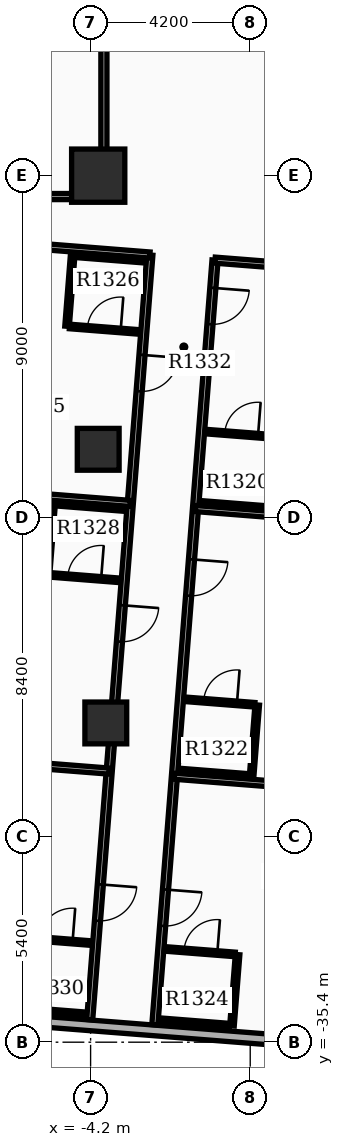
"""IFC4 building model, lengths in metres.
Left out: names, types, materials, properties, quantities, classifications, styles, units other than length and angle.
Written with IfcOpenShell. Run it as: python <this file> out.ifc"""

import sys

from ifc_helpers import new_model, si_unit, direction, frame, frame_2d, origin, origin_2d, place, context, subcontext, project, spatial, rectangle, extrude, element, fill, save


model = new_model("IFC4")
c1 = context("Model", 3, precision=1e-05, world=origin(), true_north=direction((0.0, 1.0)))
c2 = subcontext(c1, "Body", "Model", "MODEL_VIEW")
j1 = project(units=[si_unit("LENGTHUNIT", "METRE"), si_unit("PLANEANGLEUNIT", "RADIAN")], contexts=[c1])
p1 = place(None, origin())
s1 = spatial("IfcSite", under=j1, at=p1, CompositionType="ELEMENT")
p2 = place(p1, origin())
s2 = spatial("IfcBuilding", under=s1, at=p2, CompositionType="ELEMENT")
p3 = place(p2, frame((0.0, 0.0, 83.4)))
s3 = spatial("IfcBuildingStorey", under=s2, at=p3, CompositionType="ELEMENT", Elevation=83.4)
p4 = place(p3, frame((-4.0, -12.6, 0.0), z_axis=(0.0, 0.0, 1.0), x_axis=(1.0, 0.0, 0.0)))
e1 = element("IfcColumn", 1, at=p4, inside=s3, PredefinedType="COLUMN", context=c2, shape_type="SweptSolid", body=[
    extrude(rectangle(XDim=1.4, YDim=1.4, at=origin_2d()), origin(), (0.0, 0.0, 1.0), 3.9),
])
for number, where, z_axis, x_axis in (
    (2, (-4.0, -19.8, 0.0), (0.0, 0.0, 1.0), (1.0, 0.0, 0.0)),
    (3, (-3.8, -27.0, 0.0), (0.0, 0.0, 1.0), (1.0, 0.0, 0.0)),
):
    element("IfcColumn", number, at=place(p3, frame(where, z_axis=z_axis, x_axis=x_axis)), inside=s3, PredefinedType="COLUMN", context=c2, shape_type="SweptSolid", body=[
        extrude(rectangle(XDim=1.1, YDim=1.1, at=origin_2d()), origin(), (0.0, 0.0, 1.0), 3.9),
    ])
p5 = place(p3, frame((-9.599, -34.533, 0.0), z_axis=(0.0, 0.0, 1.0), x_axis=(0.996916198482, -0.078473519122, 0.0)))
e4 = element("IfcWall", 4, at=p5, inside=s3, PredefinedType="STANDARD", context=c2, shape_type="SweptSolid", body=[
    extrude(rectangle(XDim=13.72, YDim=0.28, at=frame_2d((6.86, 0.0))), origin(), (0.0, 0.0, 1.0), 2.91),
])
p6 = place(p5, frame((0.85, 0.0, 0.85)))
e5 = element("IfcOpeningElement", 5, at=p6, cuts=e4, PredefinedType="OPENING", context=c2, shape_type="SweptSolid", body=[
    extrude(rectangle(XDim=1.0, YDim=1.5, at=frame_2d((0.5, 0.75))), frame((0.0, 0.15, 0.0), z_axis=(0.0, -1.0, 0.0), x_axis=(1.0, 0.0, 0.0)), (0.0, 0.0, 1.0), 0.3),
])
p7 = place(p3, frame((-12.4, -13.15, 0.0), z_axis=(0.0, 0.0, 1.0), x_axis=(1.0, 0.0, 0.0)))
e6 = element("IfcWall", 6, at=p7, inside=s3, PredefinedType="PARTITIONING", context=c2, shape_type="SweptSolid", body=[
    extrude(rectangle(XDim=8.55, YDim=0.16, at=frame_2d((4.275, 0.0))), origin(), (0.0, 0.0, 1.0), 2.9),
])
p8 = place(p3, frame((-3.85, -13.065, 0.0), z_axis=(0.0, 0.0, 1.0), x_axis=(0.0, 1.0, 0.0)))
e7 = element("IfcWall", 7, at=p8, inside=s3, PredefinedType="PARTITIONING", context=c2, shape_type="SweptSolid", body=[
    extrude(rectangle(XDim=3.93, YDim=0.16, at=frame_2d((1.965, 0.0))), origin(), (0.0, 0.0, 1.0), 2.9),
])
p9 = place(p3, frame((-0.926, -14.823, 0.0), z_axis=(0.0, 0.0, 1.0), x_axis=(-0.078460461943, -0.996917226209, 0.0)))
e8 = element("IfcWall", 8, at=p9, inside=s3, PredefinedType="PARTITIONING", context=c2, shape_type="SweptSolid", body=[
    extrude(rectangle(XDim=20.182, YDim=0.16, at=frame_2d((10.091, 0.0))), origin(), (0.0, 0.0, 1.0), 2.9),
])
p10 = place(p9, frame((0.731, 0.0, 0.0)))
e9 = element("IfcOpeningElement", 9, at=p10, cuts=e8, PredefinedType="OPENING", context=c2, shape_type="SweptSolid", body=[
    extrude(rectangle(XDim=0.96, YDim=2.15, at=frame_2d((0.48, 1.075))), frame((0.0, 0.09, 0.0), z_axis=(0.0, -1.0, 0.0), x_axis=(1.0, 0.0, 0.0)), (0.0, 0.0, 1.0), 0.18),
])
p11 = place(p9, frame((7.896, 0.0, 0.0)))
e10 = element("IfcOpeningElement", 10, at=p11, cuts=e8, PredefinedType="OPENING", context=c2, shape_type="SweptSolid", body=[
    extrude(rectangle(XDim=0.96, YDim=2.15, at=frame_2d((0.48, 1.075))), frame((0.0, 0.09, 0.0), z_axis=(0.0, -1.0, 0.0), x_axis=(1.0, 0.0, 0.0)), (0.0, 0.0, 1.0), 0.18),
])
p12 = place(p9, frame((16.611, 0.0, 0.0)))
e11 = element("IfcOpeningElement", 11, at=p12, cuts=e8, PredefinedType="OPENING", context=c2, shape_type="SweptSolid", body=[
    extrude(rectangle(XDim=0.96, YDim=2.15, at=frame_2d((0.48, 1.075))), frame((0.0, 0.09, 0.0), z_axis=(0.0, -1.0, 0.0), x_axis=(1.0, 0.0, 0.0)), (0.0, 0.0, 1.0), 0.18),
])
p13 = place(p3, frame((-0.926, -14.823, 0.0), z_axis=(0.0, 0.0, 1.0), x_axis=(0.99691570434, -0.078479796377, 0.0)))
e12 = element("IfcWall", 12, at=p13, inside=s3, PredefinedType="PARTITIONING", context=c2, shape_type="SweptSolid", body=[
    extrude(rectangle(XDim=6.48, YDim=0.16, at=frame_2d((3.24, 0.0))), origin(), (0.0, 0.0, 1.0), 2.9),
])
p14 = place(p3, frame((-1.44, -21.359, 0.0), z_axis=(0.0, 0.0, 1.0), x_axis=(0.996917066323, -0.078462493424, 0.0)))
e13 = element("IfcWall", 13, at=p14, inside=s3, PredefinedType="PARTITIONING", context=c2, shape_type="SweptSolid", body=[
    extrude(rectangle(XDim=6.332, YDim=0.16, at=frame_2d((3.166, 0.0))), origin(), (0.0, 0.0, 1.0), 2.9),
])
p15 = place(p3, frame((-1.141, -19.336, 0.0), z_axis=(0.0, 0.0, 1.0), x_axis=(0.996916400774, -0.0784709492, 0.0)))
e14 = element("IfcWall", 14, at=p15, inside=s3, PredefinedType="PARTITIONING", context=c2, shape_type="SweptSolid", body=[
    extrude(rectangle(XDim=1.82, YDim=0.12, at=frame_2d((0.91, 0.0))), origin(), (0.0, 0.0, 1.0), 2.9),
])
p16 = place(p15, frame((0.47, 0.0, 0.0)))
e15 = element("IfcOpeningElement", 15, at=p16, cuts=e14, PredefinedType="OPENING", context=c2, shape_type="SweptSolid", body=[
    extrude(rectangle(XDim=0.88, YDim=2.1, at=frame_2d((0.44, 1.05))), frame((0.0, 0.07, 0.0), z_axis=(0.0, -1.0, 0.0), x_axis=(1.0, 0.0, 0.0)), (0.0, 0.0, 1.0), 0.14),
])
p17 = place(p3, frame((-1.288, -21.21, 0.0), z_axis=(0.0, 0.0, 1.0), x_axis=(0.996916400774, -0.0784709492, 0.0)))
e16 = element("IfcWall", 16, at=p17, inside=s3, PredefinedType="PARTITIONING", context=c2, shape_type="SweptSolid", body=[
    extrude(rectangle(XDim=1.82, YDim=0.12, at=frame_2d((0.91, 0.0))), origin(), (0.0, 0.0, 1.0), 2.9),
])
p18 = place(p3, frame((-1.994, -28.402, 0.0), z_axis=(0.0, 0.0, 1.0), x_axis=(0.996916828941, -0.078465509453, 0.0)))
e17 = element("IfcWall", 17, at=p18, inside=s3, PredefinedType="PARTITIONING", context=c2, shape_type="SweptSolid", body=[
    extrude(rectangle(XDim=6.332, YDim=0.16, at=frame_2d((3.166, 0.0))), origin(), (0.0, 0.0, 1.0), 2.9),
])
p19 = place(p3, frame((-1.695, -26.379, 0.0), z_axis=(0.0, 0.0, 1.0), x_axis=(0.996915574626, -0.078481444107, 0.0)))
e18 = element("IfcWall", 18, at=p19, inside=s3, PredefinedType="PARTITIONING", context=c2, shape_type="SweptSolid", body=[
    extrude(rectangle(XDim=1.82, YDim=0.12, at=frame_2d((0.91, 0.0))), origin(), (0.0, 0.0, 1.0), 2.9),
])
p20 = place(p19, frame((0.47, 0.0, 0.0)))
e19 = element("IfcOpeningElement", 19, at=p20, cuts=e18, PredefinedType="OPENING", context=c2, shape_type="SweptSolid", body=[
    extrude(rectangle(XDim=0.88, YDim=2.1, at=frame_2d((0.44, 1.05))), frame((0.0, 0.07, 0.0), z_axis=(0.0, -1.0, 0.0), x_axis=(1.0, 0.0, 0.0)), (0.0, 0.0, 1.0), 0.14),
])
p21 = place(p3, frame((-1.842, -28.253, 0.0), z_axis=(0.0, 0.0, 1.0), x_axis=(0.996915574626, -0.078481444107, 0.0)))
e20 = element("IfcWall", 20, at=p21, inside=s3, PredefinedType="PARTITIONING", context=c2, shape_type="SweptSolid", body=[
    extrude(rectangle(XDim=1.82, YDim=0.12, at=frame_2d((0.91, 0.0))), origin(), (0.0, 0.0, 1.0), 2.9),
])
p22 = place(p3, frame((0.184, -26.527, 0.0), z_axis=(0.0, 0.0, 1.0), x_axis=(-0.07843418698, -0.996919293781, 0.0)))
e21 = element("IfcWall", 21, at=p22, inside=s3, PredefinedType="PARTITIONING", context=c2, shape_type="SweptSolid", body=[
    extrude(rectangle(XDim=1.88, YDim=0.12, at=frame_2d((0.94, 0.0))), origin(), (0.0, 0.0, 1.0), 2.9),
])
p23 = place(p3, frame((-2.212, -32.948, 0.0), z_axis=(0.0, 0.0, 1.0), x_axis=(0.996916400774, -0.0784709492, 0.0)))
e22 = element("IfcWall", 22, at=p23, inside=s3, PredefinedType="PARTITIONING", context=c2, shape_type="SweptSolid", body=[
    extrude(rectangle(XDim=1.82, YDim=0.12, at=frame_2d((0.91, 0.0))), origin(), (0.0, 0.0, 1.0), 2.9),
])
p24 = place(p23, frame((0.47, 0.0, 0.0)))
e23 = element("IfcOpeningElement", 23, at=p24, cuts=e22, PredefinedType="OPENING", context=c2, shape_type="SweptSolid", body=[
    extrude(rectangle(XDim=0.88, YDim=2.1, at=frame_2d((0.44, 1.05))), frame((0.0, 0.07, 0.0), z_axis=(0.0, -1.0, 0.0), x_axis=(1.0, 0.0, 0.0)), (0.0, 0.0, 1.0), 0.14),
])
p25 = place(p3, frame((-2.359, -34.822, 0.0), z_axis=(0.0, 0.0, 1.0), x_axis=(0.996916400774, -0.0784709492, 0.0)))
e24 = element("IfcWall", 24, at=p25, inside=s3, PredefinedType="PARTITIONING", context=c2, shape_type="SweptSolid", body=[
    extrude(rectangle(XDim=1.82, YDim=0.12, at=frame_2d((0.91, 0.0))), origin(), (0.0, 0.0, 1.0), 2.9),
])
p26 = place(p3, frame((-0.333, -33.096, 0.0), z_axis=(0.0, 0.0, 1.0), x_axis=(-0.07843418698, -0.996919293781, 0.0)))
e25 = element("IfcWall", 25, at=p26, inside=s3, PredefinedType="PARTITIONING", context=c2, shape_type="SweptSolid", body=[
    extrude(rectangle(XDim=1.88, YDim=0.12, at=frame_2d((0.94, 0.0))), origin(), (0.0, 0.0, 1.0), 2.9),
])
p27 = place(p3, frame((-2.641, -14.688, 0.0), z_axis=(0.0, 0.0, 1.0), x_axis=(-0.078460461943, -0.996917226209, 0.0)))
e26 = element("IfcWall", 26, at=p27, inside=s3, PredefinedType="PARTITIONING", context=c2, shape_type="SweptSolid", body=[
    extrude(rectangle(XDim=20.182, YDim=0.16, at=frame_2d((10.091, 0.0))), origin(), (0.0, 0.0, 1.0), 2.9),
])
p28 = place(p27, frame((2.636, 0.0, 0.0)))
e27 = element("IfcOpeningElement", 27, at=p28, cuts=e26, PredefinedType="OPENING", context=c2, shape_type="SweptSolid", body=[
    extrude(rectangle(XDim=0.96, YDim=2.15, at=frame_2d((0.48, 1.075))), frame((0.0, 0.09, 0.0), z_axis=(0.0, -1.0, 0.0), x_axis=(1.0, 0.0, 0.0)), (0.0, 0.0, 1.0), 0.18),
])
p29 = place(p27, frame((9.243, 0.0, 0.0)))
e28 = element("IfcOpeningElement", 28, at=p29, cuts=e26, PredefinedType="OPENING", context=c2, shape_type="SweptSolid", body=[
    extrude(rectangle(XDim=0.96, YDim=2.15, at=frame_2d((0.48, 1.075))), frame((0.0, 0.09, 0.0), z_axis=(0.0, -1.0, 0.0), x_axis=(1.0, 0.0, 0.0)), (0.0, 0.0, 1.0), 0.18),
])
p30 = place(p27, frame((16.611, 0.0, 0.0)))
e29 = element("IfcOpeningElement", 29, at=p30, cuts=e26, PredefinedType="OPENING", context=c2, shape_type="SweptSolid", body=[
    extrude(rectangle(XDim=0.96, YDim=2.15, at=frame_2d((0.48, 1.075))), frame((0.0, 0.09, 0.0), z_axis=(0.0, -1.0, 0.0), x_axis=(1.0, 0.0, 0.0)), (0.0, 0.0, 1.0), 0.18),
])
p31 = place(p3, frame((-2.641, -14.688, 0.0), z_axis=(0.0, 0.0, 1.0), x_axis=(-0.996920905616, 0.078413697441, 0.0)))
e30 = element("IfcWall", 30, at=p31, inside=s3, PredefinedType="PARTITIONING", context=c2, shape_type="SweptSolid", body=[
    extrude(rectangle(XDim=5.24, YDim=0.16, at=frame_2d((2.62, 0.0))), origin(), (0.0, 0.0, 1.0), 2.9),
])
p32 = place(p3, frame((-3.155, -21.224, 0.0), z_axis=(0.0, 0.0, 1.0), x_axis=(-0.996919000774, 0.078437911089, 0.0)))
e31 = element("IfcWall", 31, at=p32, inside=s3, PredefinedType="PARTITIONING", context=c2, shape_type="SweptSolid", body=[
    extrude(rectangle(XDim=5.092, YDim=0.16, at=frame_2d((2.546, 0.0))), origin(), (0.0, 0.0, 1.0), 2.9),
])
p33 = place(p3, frame((-4.755, -16.568, 0.0), z_axis=(0.0, 0.0, 1.0), x_axis=(0.996926885478, -0.078337634704, 0.0)))
e32 = element("IfcWall", 32, at=p33, inside=s3, PredefinedType="PARTITIONING", context=c2, shape_type="SweptSolid", body=[
    extrude(rectangle(XDim=1.82, YDim=0.12, at=frame_2d((0.91, 0.0))), origin(), (0.0, 0.0, 1.0), 2.9),
])
p34 = place(p33, frame((0.47, 0.0, 0.0)))
e33 = element("IfcOpeningElement", 33, at=p34, cuts=e32, PredefinedType="OPENING", context=c2, shape_type="SweptSolid", body=[
    extrude(rectangle(XDim=0.88, YDim=2.1, at=frame_2d((0.44, 1.05))), frame((0.0, 0.07, 0.0), z_axis=(0.0, -1.0, 0.0), x_axis=(1.0, 0.0, 0.0)), (0.0, 0.0, 1.0), 0.14),
])
p35 = place(p3, frame((-4.607, -14.694, 0.0), z_axis=(0.0, 0.0, 1.0), x_axis=(0.996916400774, -0.0784709492, 0.0)))
e34 = element("IfcWall", 34, at=p35, inside=s3, PredefinedType="PARTITIONING", context=c2, shape_type="SweptSolid", body=[
    extrude(rectangle(XDim=1.82, YDim=0.12, at=frame_2d((0.91, 0.0))), origin(), (0.0, 0.0, 1.0), 2.9),
])
p36 = place(p3, frame((-4.672, -14.689, 0.0), z_axis=(0.0, 0.0, 1.0), x_axis=(-0.07843418698, -0.996919293781, 0.0)))
e35 = element("IfcWall", 35, at=p36, inside=s3, PredefinedType="PARTITIONING", context=c2, shape_type="SweptSolid", body=[
    extrude(rectangle(XDim=1.88, YDim=0.12, at=frame_2d((0.94, 0.0))), origin(), (0.0, 0.0, 1.0), 2.9),
])
p37 = place(p3, frame((-3.709, -28.267, 0.0), z_axis=(0.0, 0.0, 1.0), x_axis=(-0.996919000774, 0.078437911089, 0.0)))
e36 = element("IfcWall", 36, at=p37, inside=s3, PredefinedType="PARTITIONING", context=c2, shape_type="SweptSolid", body=[
    extrude(rectangle(XDim=5.092, YDim=0.16, at=frame_2d((2.546, 0.0))), origin(), (0.0, 0.0, 1.0), 2.9),
])
p38 = place(p3, frame((-5.269, -23.104, 0.0), z_axis=(0.0, 0.0, 1.0), x_axis=(0.996915574626, -0.078481444107, 0.0)))
e37 = element("IfcWall", 37, at=p38, inside=s3, PredefinedType="PARTITIONING", context=c2, shape_type="SweptSolid", body=[
    extrude(rectangle(XDim=1.82, YDim=0.12, at=frame_2d((0.91, 0.0))), origin(), (0.0, 0.0, 1.0), 2.9),
])
p39 = place(p38, frame((0.47, 0.0, 0.0)))
e38 = element("IfcOpeningElement", 38, at=p39, cuts=e37, PredefinedType="OPENING", context=c2, shape_type="SweptSolid", body=[
    extrude(rectangle(XDim=0.88, YDim=2.1, at=frame_2d((0.44, 1.05))), frame((0.0, 0.07, 0.0), z_axis=(0.0, -1.0, 0.0), x_axis=(1.0, 0.0, 0.0)), (0.0, 0.0, 1.0), 0.14),
])
p40 = place(p3, frame((-5.121, -21.229, 0.0), z_axis=(0.0, 0.0, 1.0), x_axis=(0.996915574626, -0.078481444107, 0.0)))
e39 = element("IfcWall", 39, at=p40, inside=s3, PredefinedType="PARTITIONING", context=c2, shape_type="SweptSolid", body=[
    extrude(rectangle(XDim=1.82, YDim=0.12, at=frame_2d((0.91, 0.0))), origin(), (0.0, 0.0, 1.0), 2.9),
])
p41 = place(p3, frame((-5.186, -21.225, 0.0), z_axis=(0.0, 0.0, 1.0), x_axis=(-0.078444342213, -0.99691849475, 0.0)))
e40 = element("IfcWall", 40, at=p41, inside=s3, PredefinedType="PARTITIONING", context=c2, shape_type="SweptSolid", body=[
    extrude(rectangle(XDim=1.88, YDim=0.12, at=frame_2d((0.94, 0.0))), origin(), (0.0, 0.0, 1.0), 2.9),
])
p42 = place(p3, frame((-6.02, -32.648, 0.0), z_axis=(0.0, 0.0, 1.0), x_axis=(0.996915574626, -0.078481444107, 0.0)))
e41 = element("IfcWall", 41, at=p42, inside=s3, PredefinedType="PARTITIONING", context=c2, shape_type="SweptSolid", body=[
    extrude(rectangle(XDim=1.82, YDim=0.12, at=frame_2d((0.91, 0.0))), origin(), (0.0, 0.0, 1.0), 2.9),
])
p43 = place(p42, frame((0.47, 0.0, 0.0)))
e42 = element("IfcOpeningElement", 42, at=p43, cuts=e41, PredefinedType="OPENING", context=c2, shape_type="SweptSolid", body=[
    extrude(rectangle(XDim=0.88, YDim=2.1, at=frame_2d((0.44, 1.05))), frame((0.0, 0.07, 0.0), z_axis=(0.0, -1.0, 0.0), x_axis=(1.0, 0.0, 0.0)), (0.0, 0.0, 1.0), 0.14),
])
p44 = place(p3, frame((-6.167, -34.522, 0.0), z_axis=(0.0, 0.0, 1.0), x_axis=(0.996915574626, -0.078481444107, 0.0)))
e43 = element("IfcWall", 43, at=p44, inside=s3, PredefinedType="PARTITIONING", context=c2, shape_type="SweptSolid", body=[
    extrude(rectangle(XDim=1.82, YDim=0.12, at=frame_2d((0.91, 0.0))), origin(), (0.0, 0.0, 1.0), 2.9),
])
p45 = place(p10, origin())
e44 = element("IfcDoor", 44, at=p45, inside=s3, OperationType="SINGLE_SWING_LEFT", PredefinedType="DOOR", context=c2, shape_type="SweptSolid", body=[
    extrude(rectangle(XDim=0.96, YDim=2.15, at=frame_2d((0.48, 1.075))), frame((0.0, 0.025, 0.0), z_axis=(0.0, -1.0, 0.0), x_axis=(1.0, 0.0, 0.0)), (0.0, 0.0, 1.0), 0.05),
])
fill(e9, e44)
p46 = place(p16, origin())
e45 = element("IfcDoor", 45, at=p46, inside=s3, OperationType="SINGLE_SWING_RIGHT", PredefinedType="DOOR", context=c2, shape_type="SweptSolid", body=[
    extrude(rectangle(XDim=0.88, YDim=2.1, at=frame_2d((0.44, 1.05))), frame((0.0, 0.025, 0.0), z_axis=(0.0, -1.0, 0.0), x_axis=(1.0, 0.0, 0.0)), (0.0, 0.0, 1.0), 0.05),
])
fill(e15, e45)
p47 = place(p11, origin())
e46 = element("IfcDoor", 46, at=p47, inside=s3, OperationType="SINGLE_SWING_LEFT", PredefinedType="DOOR", context=c2, shape_type="SweptSolid", body=[
    extrude(rectangle(XDim=0.96, YDim=2.15, at=frame_2d((0.48, 1.075))), frame((0.0, 0.025, 0.0), z_axis=(0.0, -1.0, 0.0), x_axis=(1.0, 0.0, 0.0)), (0.0, 0.0, 1.0), 0.05),
])
fill(e10, e46)
p48 = place(p20, origin())
e47 = element("IfcDoor", 47, at=p48, inside=s3, OperationType="SINGLE_SWING_RIGHT", PredefinedType="DOOR", context=c2, shape_type="SweptSolid", body=[
    extrude(rectangle(XDim=0.88, YDim=2.1, at=frame_2d((0.44, 1.05))), frame((0.0, 0.025, 0.0), z_axis=(0.0, -1.0, 0.0), x_axis=(1.0, 0.0, 0.0)), (0.0, 0.0, 1.0), 0.05),
])
fill(e19, e47)
p49 = place(p12, origin())
e48 = element("IfcDoor", 48, at=p49, inside=s3, OperationType="SINGLE_SWING_LEFT", PredefinedType="DOOR", context=c2, shape_type="SweptSolid", body=[
    extrude(rectangle(XDim=0.96, YDim=2.15, at=frame_2d((0.48, 1.075))), frame((0.0, 0.025, 0.0), z_axis=(0.0, -1.0, 0.0), x_axis=(1.0, 0.0, 0.0)), (0.0, 0.0, 1.0), 0.05),
])
fill(e11, e48)
p50 = place(p24, origin())
e49 = element("IfcDoor", 49, at=p50, inside=s3, OperationType="SINGLE_SWING_RIGHT", PredefinedType="DOOR", context=c2, shape_type="SweptSolid", body=[
    extrude(rectangle(XDim=0.88, YDim=2.1, at=frame_2d((0.44, 1.05))), frame((0.0, 0.025, 0.0), z_axis=(0.0, -1.0, 0.0), x_axis=(1.0, 0.0, 0.0)), (0.0, 0.0, 1.0), 0.05),
])
fill(e23, e49)
p51 = place(p28, origin())
e50 = element("IfcDoor", 50, at=p51, inside=s3, OperationType="SINGLE_SWING_LEFT", PredefinedType="DOOR", context=c2, shape_type="SweptSolid", body=[
    extrude(rectangle(XDim=0.96, YDim=2.15, at=frame_2d((0.48, 1.075))), frame((0.0, 0.025, 0.0), z_axis=(0.0, -1.0, 0.0), x_axis=(1.0, 0.0, 0.0)), (0.0, 0.0, 1.0), 0.05),
])
fill(e27, e50)
p52 = place(p34, origin())
e51 = element("IfcDoor", 51, at=p52, inside=s3, OperationType="SINGLE_SWING_RIGHT", PredefinedType="DOOR", context=c2, shape_type="SweptSolid", body=[
    extrude(rectangle(XDim=0.88, YDim=2.1, at=frame_2d((0.44, 1.05))), frame((0.0, 0.025, 0.0), z_axis=(0.0, -1.0, 0.0), x_axis=(1.0, 0.0, 0.0)), (0.0, 0.0, 1.0), 0.05),
])
fill(e33, e51)
p53 = place(p29, origin())
e52 = element("IfcDoor", 52, at=p53, inside=s3, OperationType="SINGLE_SWING_LEFT", PredefinedType="DOOR", context=c2, shape_type="SweptSolid", body=[
    extrude(rectangle(XDim=0.96, YDim=2.15, at=frame_2d((0.48, 1.075))), frame((0.0, 0.025, 0.0), z_axis=(0.0, -1.0, 0.0), x_axis=(1.0, 0.0, 0.0)), (0.0, 0.0, 1.0), 0.05),
])
fill(e28, e52)
p54 = place(p39, origin())
e53 = element("IfcDoor", 53, at=p54, inside=s3, OperationType="SINGLE_SWING_RIGHT", PredefinedType="DOOR", context=c2, shape_type="SweptSolid", body=[
    extrude(rectangle(XDim=0.88, YDim=2.1, at=frame_2d((0.44, 1.05))), frame((0.0, 0.025, 0.0), z_axis=(0.0, -1.0, 0.0), x_axis=(1.0, 0.0, 0.0)), (0.0, 0.0, 1.0), 0.05),
])
fill(e38, e53)
p55 = place(p30, origin())
e54 = element("IfcDoor", 54, at=p55, inside=s3, OperationType="SINGLE_SWING_LEFT", PredefinedType="DOOR", context=c2, shape_type="SweptSolid", body=[
    extrude(rectangle(XDim=0.96, YDim=2.15, at=frame_2d((0.48, 1.075))), frame((0.0, 0.025, 0.0), z_axis=(0.0, -1.0, 0.0), x_axis=(1.0, 0.0, 0.0)), (0.0, 0.0, 1.0), 0.05),
])
fill(e29, e54)
p56 = place(p43, origin())
e55 = element("IfcDoor", 55, at=p56, inside=s3, OperationType="SINGLE_SWING_RIGHT", PredefinedType="DOOR", context=c2, shape_type="SweptSolid", body=[
    extrude(rectangle(XDim=0.88, YDim=2.1, at=frame_2d((0.44, 1.05))), frame((0.0, 0.025, 0.0), z_axis=(0.0, -1.0, 0.0), x_axis=(1.0, 0.0, 0.0)), (0.0, 0.0, 1.0), 0.05),
])
fill(e42, e55)
save(model, sys.argv[1])
